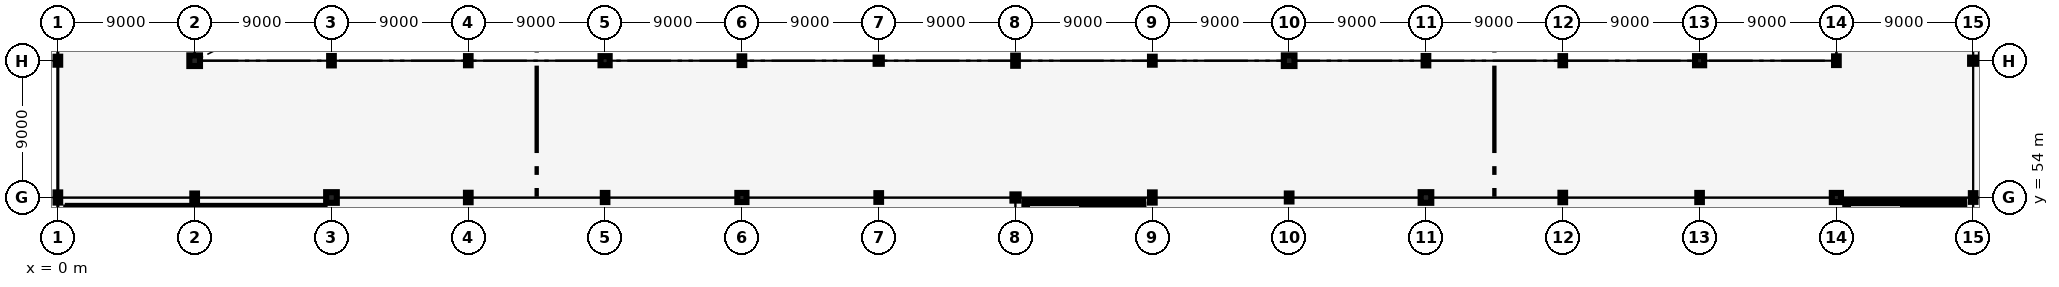
"""IFC4 building model, lengths in metres.
Left out: names, types, materials, properties, quantities, classifications, styles, units other than length and angle.
Written with IfcOpenShell. Run it as: python <this file> out.ifc"""

import sys

from ifc_helpers import new_model, si_unit, direction, frame, frame_2d, origin, origin_2d, place, context, subcontext, project, spatial, rectangle, hollow_circle, i_section, extrude, element, save


model = new_model("IFC4")
c1 = context("Model", 3, precision=1e-05, world=origin(), true_north=direction((0.0, 1.0)))
c2 = subcontext(c1, "Body", "Model", "MODEL_VIEW")
j1 = project(units=[si_unit("LENGTHUNIT", "METRE"), si_unit("PLANEANGLEUNIT", "RADIAN")], contexts=[c1])
p1 = place(None, origin())
s1 = spatial("IfcSite", under=j1, at=p1, CompositionType="ELEMENT")
p2 = place(p1, origin())
s2 = spatial("IfcBuilding", under=s1, at=p2, CompositionType="ELEMENT")
p3 = place(p2, frame((0.0, 0.0, 6.0)))
s3 = spatial("IfcBuildingStorey", under=s2, at=p3, CompositionType="ELEMENT", Elevation=6.0)
p4 = place(p3, frame((0.0, 54.0, 0.0), z_axis=(0.0, 0.0, 1.0), x_axis=(1.0, 0.0, 0.0)))
e1 = element("IfcColumn", 1, at=p4, inside=s3, PredefinedType="COLUMN", context=c2, shape_type="SweptSolid", body=[
    extrude(i_section(OverallWidth=0.305, OverallDepth=0.668, WebThickness=0.021, FlangeThickness=0.04, FilletRadius=0.027, at=origin_2d()), origin(), (0.0, 0.0, 1.0), 6.0),
])
for number, where, z_axis, x_axis in (
    (2, (0.0, 63.0, 0.0), (0.0, 0.0, 1.0), (1.0, 0.0, 0.0)),
    (3, (9.0, 54.0, 0.0), (0.0, 0.0, 1.0), (1.0, 0.0, 0.0)),
):
    element("IfcColumn", number, at=place(p3, frame(where, z_axis=z_axis, x_axis=x_axis)), inside=s3, PredefinedType="COLUMN", context=c2, shape_type="SweptSolid", body=[
        extrude(i_section(OverallWidth=0.306, OverallDepth=0.524, WebThickness=0.021, FlangeThickness=0.04, FilletRadius=0.027, at=origin_2d()), origin(), (0.0, 0.0, 1.0), 6.0),
    ])
for number, where, z_axis, x_axis in (
    (4, (9.0, 63.0, 0.0), (0.0, 0.0, 1.0), (1.0, 0.0, 0.0)),
    (5, (18.0, 54.0, 0.0), (0.0, 0.0, 1.0), (1.0, 0.0, 0.0)),
):
    element("IfcColumn", number, at=place(p3, frame(where, z_axis=z_axis, x_axis=x_axis)), inside=s3, PredefinedType="COLUMN", context=c2, shape_type="SweptSolid", body=[
        extrude(rectangle(XDim=0.7, YDim=0.7, at=origin_2d()), origin(), (0.0, 0.0, 1.0), 6.0),
    ])
for number, where, z_axis, x_axis in (
    (6, (18.0, 63.0, 0.0), (0.0, 0.0, 1.0), (1.0, 0.0, 0.0)),
    (7, (27.0, 54.0, 0.0), (0.0, 0.0, 1.0), (1.0, 0.0, 0.0)),
):
    element("IfcColumn", number, at=place(p3, frame(where, z_axis=z_axis, x_axis=x_axis)), inside=s3, PredefinedType="COLUMN", context=c2, shape_type="SweptSolid", body=[
        extrude(i_section(OverallWidth=0.305, OverallDepth=0.62, WebThickness=0.021, FlangeThickness=0.04, FilletRadius=0.027, at=origin_2d()), origin(), (0.0, 0.0, 1.0), 6.0),
    ])
for number, where, z_axis, x_axis in (
    (8, (27.0, 63.0, 0.0), (0.0, 0.0, 1.0), (1.0, 0.0, 0.0)),
    (9, (36.0, 54.0, 0.0), (0.0, 0.0, 1.0), (1.0, 0.0, 0.0)),
):
    element("IfcColumn", number, at=place(p3, frame(where, z_axis=z_axis, x_axis=x_axis)), inside=s3, PredefinedType="COLUMN", context=c2, shape_type="SweptSolid", body=[
        extrude(i_section(OverallWidth=0.3, OverallDepth=0.6, WebThickness=0.015, FlangeThickness=0.03, FilletRadius=0.027, at=origin_2d()), origin(), (0.0, 0.0, 1.0), 6.0),
    ])
for number, where, z_axis, x_axis in (
    (10, (36.0, 63.0, 0.0), (0.0, 0.0, 1.0), (1.0, 0.0, 0.0)),
    (11, (45.0, 54.0, 0.0), (0.0, 0.0, 1.0), (1.0, 0.0, 0.0)),
):
    element("IfcColumn", number, at=place(p3, frame(where, z_axis=z_axis, x_axis=x_axis)), inside=s3, PredefinedType="COLUMN", context=c2, shape_type="SweptSolid", body=[
        extrude(rectangle(XDim=0.6, YDim=0.6, at=origin_2d()), origin(), (0.0, 0.0, 1.0), 6.0),
    ])
for number, where, z_axis, x_axis in (
    (12, (45.0, 63.0, 0.0), (0.0, 0.0, 1.0), (1.0, 0.0, 0.0)),
    (13, (54.0, 54.0, 0.0), (0.0, 0.0, 1.0), (1.0, 0.0, 0.0)),
):
    element("IfcColumn", number, at=place(p3, frame(where, z_axis=z_axis, x_axis=x_axis)), inside=s3, PredefinedType="COLUMN", context=c2, shape_type="SweptSolid", body=[
        extrude(i_section(OverallWidth=0.306, OverallDepth=0.572, WebThickness=0.021, FlangeThickness=0.04, FilletRadius=0.027, at=origin_2d()), origin(), (0.0, 0.0, 1.0), 6.0),
    ])
for number, where, z_axis, x_axis in (
    (14, (54.0, 63.0, 0.0), (0.0, 0.0, 1.0), (1.0, 0.0, 0.0)),
    (15, (63.0, 54.0, 0.0), (0.0, 0.0, 1.0), (1.0, 0.0, 0.0)),
):
    element("IfcColumn", number, at=place(p3, frame(where, z_axis=z_axis, x_axis=x_axis)), inside=s3, PredefinedType="COLUMN", context=c2, shape_type="SweptSolid", body=[
        extrude(hollow_circle(Radius=0.203, WallThickness=0.016, at=origin_2d()), origin(), (0.0, 0.0, 1.0), 6.0),
    ])
for number, where, z_axis, x_axis in (
    (16, (63.0, 63.0, 0.0), (0.0, 0.0, 1.0), (1.0, 0.0, 0.0)),
    (17, (72.0, 54.0, 0.0), (0.0, 0.0, 1.0), (1.0, 0.0, 0.0)),
):
    element("IfcColumn", number, at=place(p3, frame(where, z_axis=z_axis, x_axis=x_axis)), inside=s3, PredefinedType="COLUMN", context=c2, shape_type="SweptSolid", body=[
        extrude(i_section(OverallWidth=0.305, OverallDepth=0.668, WebThickness=0.021, FlangeThickness=0.04, FilletRadius=0.027, at=origin_2d()), origin(), (0.0, 0.0, 1.0), 6.0),
    ])
for number, where, z_axis, x_axis in (
    (18, (72.0, 63.0, 0.0), (0.0, 0.0, 1.0), (1.0, 0.0, 0.0)),
    (19, (81.0, 54.0, 0.0), (0.0, 0.0, 1.0), (1.0, 0.0, 0.0)),
):
    element("IfcColumn", number, at=place(p3, frame(where, z_axis=z_axis, x_axis=x_axis)), inside=s3, PredefinedType="COLUMN", context=c2, shape_type="SweptSolid", body=[
        extrude(i_section(OverallWidth=0.306, OverallDepth=0.524, WebThickness=0.021, FlangeThickness=0.04, FilletRadius=0.027, at=origin_2d()), origin(), (0.0, 0.0, 1.0), 6.0),
    ])
for number, where, z_axis, x_axis in (
    (20, (81.0, 63.0, 0.0), (0.0, 0.0, 1.0), (1.0, 0.0, 0.0)),
    (21, (90.0, 54.0, 0.0), (0.0, 0.0, 1.0), (1.0, 0.0, 0.0)),
):
    element("IfcColumn", number, at=place(p3, frame(where, z_axis=z_axis, x_axis=x_axis)), inside=s3, PredefinedType="COLUMN", context=c2, shape_type="SweptSolid", body=[
        extrude(rectangle(XDim=0.7, YDim=0.7, at=origin_2d()), origin(), (0.0, 0.0, 1.0), 6.0),
    ])
for number, where, z_axis, x_axis in (
    (22, (90.0, 63.0, 0.0), (0.0, 0.0, 1.0), (1.0, 0.0, 0.0)),
    (23, (99.0, 54.0, 0.0), (0.0, 0.0, 1.0), (1.0, 0.0, 0.0)),
):
    element("IfcColumn", number, at=place(p3, frame(where, z_axis=z_axis, x_axis=x_axis)), inside=s3, PredefinedType="COLUMN", context=c2, shape_type="SweptSolid", body=[
        extrude(i_section(OverallWidth=0.305, OverallDepth=0.62, WebThickness=0.021, FlangeThickness=0.04, FilletRadius=0.027, at=origin_2d()), origin(), (0.0, 0.0, 1.0), 6.0),
    ])
for number, where, z_axis, x_axis in (
    (24, (99.0, 63.0, 0.0), (0.0, 0.0, 1.0), (1.0, 0.0, 0.0)),
    (25, (108.0, 54.0, 0.0), (0.0, 0.0, 1.0), (1.0, 0.0, 0.0)),
):
    element("IfcColumn", number, at=place(p3, frame(where, z_axis=z_axis, x_axis=x_axis)), inside=s3, PredefinedType="COLUMN", context=c2, shape_type="SweptSolid", body=[
        extrude(i_section(OverallWidth=0.3, OverallDepth=0.6, WebThickness=0.015, FlangeThickness=0.03, FilletRadius=0.027, at=origin_2d()), origin(), (0.0, 0.0, 1.0), 6.0),
    ])
for number, where, z_axis, x_axis in (
    (26, (108.0, 63.0, 0.0), (0.0, 0.0, 1.0), (1.0, 0.0, 0.0)),
    (27, (117.0, 54.0, 0.0), (0.0, 0.0, 1.0), (1.0, 0.0, 0.0)),
):
    element("IfcColumn", number, at=place(p3, frame(where, z_axis=z_axis, x_axis=x_axis)), inside=s3, PredefinedType="COLUMN", context=c2, shape_type="SweptSolid", body=[
        extrude(rectangle(XDim=0.6, YDim=0.6, at=origin_2d()), origin(), (0.0, 0.0, 1.0), 6.0),
    ])
for number, where, z_axis, x_axis in (
    (28, (117.0, 63.0, 0.0), (0.0, 0.0, 1.0), (1.0, 0.0, 0.0)),
    (29, (126.0, 54.0, 0.0), (0.0, 0.0, 1.0), (1.0, 0.0, 0.0)),
):
    element("IfcColumn", number, at=place(p3, frame(where, z_axis=z_axis, x_axis=x_axis)), inside=s3, PredefinedType="COLUMN", context=c2, shape_type="SweptSolid", body=[
        extrude(i_section(OverallWidth=0.306, OverallDepth=0.572, WebThickness=0.021, FlangeThickness=0.04, FilletRadius=0.027, at=origin_2d()), origin(), (0.0, 0.0, 1.0), 6.0),
    ])
p5 = place(p3, frame((126.0, 63.0, 0.0), z_axis=(0.0, 0.0, 1.0), x_axis=(1.0, 0.0, 0.0)))
e30 = element("IfcColumn", 30, at=p5, inside=s3, PredefinedType="COLUMN", context=c2, shape_type="SweptSolid", body=[
    extrude(hollow_circle(Radius=0.203, WallThickness=0.016, at=origin_2d()), origin(), (0.0, 0.0, 1.0), 6.0),
])
p6 = place(p3, frame((63.725, 45.47, 0.0), z_axis=(0.0, 0.0, 1.0), x_axis=(0.0, 1.0, 0.0)))
e31 = element("IfcWall", 31, at=p6, inside=s3, PredefinedType="SHEAR", context=c2, shape_type="SweptSolid", body=[
    extrude(rectangle(XDim=8.06, YDim=0.25, at=frame_2d((4.03, 0.0))), origin(), (0.0, 0.0, 1.0), 5.71),
])
p7 = place(p3, frame((71.275, 45.47, 0.0), z_axis=(0.0, 0.0, 1.0), x_axis=(0.0, 1.0, 0.0)))
e32 = element("IfcWall", 32, at=p7, inside=s3, PredefinedType="SHEAR", context=c2, shape_type="SweptSolid", body=[
    extrude(rectangle(XDim=8.06, YDim=0.25, at=frame_2d((4.03, 0.0))), origin(), (0.0, 0.0, 1.0), 5.71),
])
p8 = place(p7, frame((1.15, 0.0, 0.0)))
e33 = element("IfcOpeningElement", 33, at=p8, cuts=e32, PredefinedType="OPENING", context=c2, shape_type="SweptSolid", body=[
    extrude(rectangle(XDim=1.6, YDim=2.2, at=frame_2d((0.8, 1.1))), frame((0.0, 0.135, 0.0), z_axis=(0.0, -1.0, 0.0), x_axis=(1.0, 0.0, 0.0)), (0.0, 0.0, 1.0), 0.27),
])
p9 = place(p3, frame((63.6, 53.655, 0.0), z_axis=(0.0, 0.0, 1.0), x_axis=(1.0, 0.0, 0.0)))
e34 = element("IfcWall", 34, at=p9, inside=s3, PredefinedType="SHEAR", context=c2, shape_type="SweptSolid", body=[
    extrude(rectangle(XDim=7.8, YDim=0.25, at=frame_2d((3.9, 0.0))), origin(), (0.0, 0.0, 1.0), 5.71),
])
p10 = place(p3, frame((67.415, 45.47, 0.0), z_axis=(0.0, 0.0, 1.0), x_axis=(0.0, 1.0, 0.0)))
e35 = element("IfcWall", 35, at=p10, inside=s3, PredefinedType="SHEAR", context=c2, shape_type="SweptSolid", body=[
    extrude(rectangle(XDim=8.06, YDim=0.25, at=frame_2d((4.03, 0.0))), origin(), (0.0, 0.0, 1.0), 5.71),
])
p11 = place(p10, frame((0.25, 0.0, 0.0)))
e36 = element("IfcOpeningElement", 36, at=p11, cuts=e35, PredefinedType="OPENING", context=c2, shape_type="SweptSolid", body=[
    extrude(rectangle(XDim=1.15, YDim=2.15, at=frame_2d((0.575, 1.075))), frame((0.0, 0.135, 0.0), z_axis=(0.0, -1.0, 0.0), x_axis=(1.0, 0.0, 0.0)), (0.0, 0.0, 1.0), 0.27),
])
p12 = place(p3, frame((117.725, 45.47, 0.0), z_axis=(0.0, 0.0, 1.0), x_axis=(0.0, 1.0, 0.0)))
e37 = element("IfcWall", 37, at=p12, inside=s3, PredefinedType="SHEAR", context=c2, shape_type="SweptSolid", body=[
    extrude(rectangle(XDim=8.06, YDim=0.25, at=frame_2d((4.03, 0.0))), origin(), (0.0, 0.0, 1.0), 5.71),
])
p13 = place(p3, frame((125.275, 45.47, 0.0), z_axis=(0.0, 0.0, 1.0), x_axis=(0.0, 1.0, 0.0)))
e38 = element("IfcWall", 38, at=p13, inside=s3, PredefinedType="SHEAR", context=c2, shape_type="SweptSolid", body=[
    extrude(rectangle(XDim=8.06, YDim=0.25, at=frame_2d((4.03, 0.0))), origin(), (0.0, 0.0, 1.0), 5.71),
])
p14 = place(p13, frame((1.15, 0.0, 0.0)))
e39 = element("IfcOpeningElement", 39, at=p14, cuts=e38, PredefinedType="OPENING", context=c2, shape_type="SweptSolid", body=[
    extrude(rectangle(XDim=1.6, YDim=2.2, at=frame_2d((0.8, 1.1))), frame((0.0, 0.135, 0.0), z_axis=(0.0, -1.0, 0.0), x_axis=(1.0, 0.0, 0.0)), (0.0, 0.0, 1.0), 0.27),
])
p15 = place(p3, frame((117.6, 53.655, 0.0), z_axis=(0.0, 0.0, 1.0), x_axis=(1.0, 0.0, 0.0)))
e40 = element("IfcWall", 40, at=p15, inside=s3, PredefinedType="SHEAR", context=c2, shape_type="SweptSolid", body=[
    extrude(rectangle(XDim=7.8, YDim=0.25, at=frame_2d((3.9, 0.0))), origin(), (0.0, 0.0, 1.0), 5.71),
])
p16 = place(p3, frame((121.415, 45.47, 0.0), z_axis=(0.0, 0.0, 1.0), x_axis=(0.0, 1.0, 0.0)))
e41 = element("IfcWall", 41, at=p16, inside=s3, PredefinedType="SHEAR", context=c2, shape_type="SweptSolid", body=[
    extrude(rectangle(XDim=8.06, YDim=0.25, at=frame_2d((4.03, 0.0))), origin(), (0.0, 0.0, 1.0), 5.71),
])
p17 = place(p16, frame((0.25, 0.0, 0.0)))
e42 = element("IfcOpeningElement", 42, at=p17, cuts=e41, PredefinedType="OPENING", context=c2, shape_type="SweptSolid", body=[
    extrude(rectangle(XDim=1.15, YDim=2.15, at=frame_2d((0.575, 1.075))), frame((0.0, 0.135, 0.0), z_axis=(0.0, -1.0, 0.0), x_axis=(1.0, 0.0, 0.0)), (0.0, 0.0, 1.0), 0.27),
])
p18 = place(p3, frame((0.657, 53.4, 0.0), z_axis=(0.0, 0.0, 1.0), x_axis=(1.0, 0.0, 0.0)))
e43 = element("IfcWall", 43, at=p18, inside=s3, PredefinedType="PARTITIONING", context=c2, shape_type="SweptSolid", body=[
    extrude(rectangle(XDim=16.886, YDim=0.095, at=frame_2d((8.443, 0.0))), origin(), (0.0, 0.0, 1.0), 4.85),
])
save(model, sys.argv[1])
